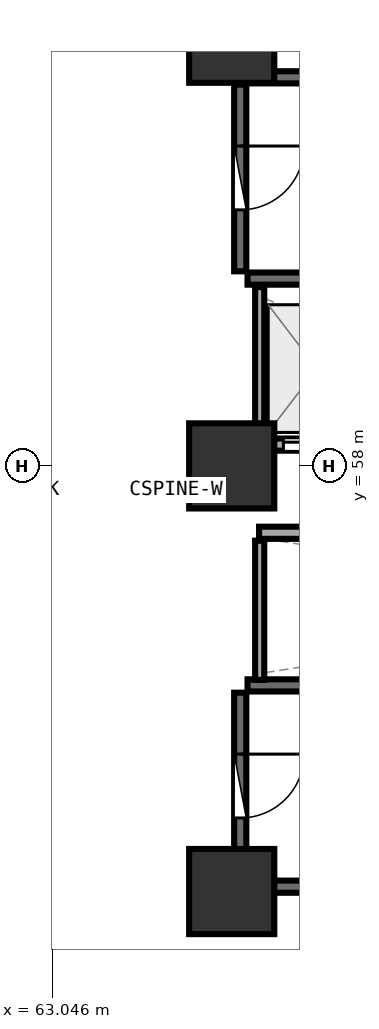
"""IFC4 building model, lengths in metres.
Left out: names, types, materials, properties, quantities, classifications, styles, units other than length and angle.
Written with IfcOpenShell. Run it as: python <this file> out.ifc"""

import sys

from ifc_helpers import new_model, si_unit, direction, frame, frame_2d, origin, origin_2d, place, context, subcontext, project, spatial, rectangle, extrude, element, fill, save


model = new_model("IFC4")
c1 = context("Model", 3, precision=1e-05, world=origin(), true_north=direction((0.0, 1.0)))
c2 = subcontext(c1, "Body", "Model", "MODEL_VIEW")
j1 = project(units=[si_unit("LENGTHUNIT", "METRE"), si_unit("PLANEANGLEUNIT", "RADIAN")], contexts=[c1])
p1 = place(None, origin())
s1 = spatial("IfcSite", under=j1, at=p1, CompositionType="ELEMENT")
p2 = place(p1, origin())
s2 = spatial("IfcBuilding", under=s1, at=p2, CompositionType="ELEMENT")
p3 = place(p2, frame((0.0, 0.0, 56.25)))
s3 = spatial("IfcBuildingStorey", under=s2, at=p3, CompositionType="ELEMENT", Elevation=56.25)
for number, where, z_axis, x_axis in (
    (1, (66.0, 51.0, 0.0), (0.0, 0.0, 1.0), (1.0, 0.0, 0.0)),
    (2, (66.0, 65.0, 0.0), (0.0, 0.0, 1.0), (1.0, 0.0, 0.0)),
    (3, (66.0, 58.0, 0.0), (0.0, 0.0, 1.0), (1.0, 0.0, 0.0)),
):
    element("IfcColumn", number, at=place(p3, frame(where, z_axis=z_axis, x_axis=x_axis)), inside=s3, PredefinedType="PILASTER", context=c2, shape_type="SweptSolid", body=[
        extrude(rectangle(XDim=1.4, YDim=1.4, at=origin_2d()), origin(), (0.0, 0.0, 1.0), 3.75),
    ])
for number, where, z_axis, x_axis in (
    (4, (66.26, 61.08, 0.0), (0.0, 0.0, 1.0), (1.0, 0.0, 0.0)),
    (5, (73.42, 64.39, 0.0), (0.0, 0.0, 1.0), (-1.0, 0.0, 0.0)),
):
    element("IfcWall", number, at=place(p3, frame(where, z_axis=z_axis, x_axis=x_axis)), inside=s3, PredefinedType="SHEAR", context=c2, shape_type="SweptSolid", body=[
        extrude(rectangle(XDim=7.16, YDim=0.2, at=frame_2d((3.58, 0.0))), origin(), (0.0, 0.0, 1.0), 3.49),
    ])
p4 = place(p3, frame((66.14, 64.27, 0.0), z_axis=(0.0, 0.0, 1.0), x_axis=(0.0, -1.0, 0.0)))
e6 = element("IfcWall", 6, at=p4, inside=s3, PredefinedType="SHEAR", context=c2, shape_type="SweptSolid", body=[
    extrude(rectangle(XDim=3.07, YDim=0.2, at=frame_2d((1.535, 0.0))), origin(), (0.0, 0.0, 1.0), 3.49),
])
p5 = place(p4, frame((1.01, 0.0, 0.0)))
e7 = element("IfcOpeningElement", 7, at=p5, cuts=e6, PredefinedType="OPENING", context=c2, shape_type="SweptSolid", body=[
    extrude(rectangle(XDim=1.05, YDim=2.1, at=frame_2d((0.525, 1.05))), frame((0.0, 0.11, 0.0), z_axis=(0.0, -1.0, 0.0), x_axis=(1.0, 0.0, 0.0)), (0.0, 0.0, 1.0), 0.22),
])
for number, where, z_axis, x_axis in (
    (8, (66.26, 51.08, 0.0), (0.0, 0.0, 1.0), (1.0, 0.0, 0.0)),
    (9, (73.42, 54.39, 0.0), (0.0, 0.0, 1.0), (-1.0, 0.0, 0.0)),
):
    element("IfcWall", number, at=place(p3, frame(where, z_axis=z_axis, x_axis=x_axis)), inside=s3, PredefinedType="SHEAR", context=c2, shape_type="SweptSolid", body=[
        extrude(rectangle(XDim=7.16, YDim=0.2, at=frame_2d((3.58, 0.0))), origin(), (0.0, 0.0, 1.0), 3.49),
    ])
p6 = place(p3, frame((66.14, 54.27, 0.0), z_axis=(0.0, 0.0, 1.0), x_axis=(0.0, -1.0, 0.0)))
e10 = element("IfcWall", 10, at=p6, inside=s3, PredefinedType="SHEAR", context=c2, shape_type="SweptSolid", body=[
    extrude(rectangle(XDim=3.07, YDim=0.2, at=frame_2d((1.535, 0.0))), origin(), (0.0, 0.0, 1.0), 3.49),
])
p7 = place(p6, frame((1.01, 0.0, 0.0)))
e11 = element("IfcOpeningElement", 11, at=p7, cuts=e10, PredefinedType="OPENING", context=c2, shape_type="SweptSolid", body=[
    extrude(rectangle(XDim=1.05, YDim=2.1, at=frame_2d((0.525, 1.05))), frame((0.0, 0.11, 0.0), z_axis=(0.0, -1.0, 0.0), x_axis=(1.0, 0.0, 0.0)), (0.0, 0.0, 1.0), 0.22),
])
p8 = place(p3, frame((66.45, 58.35, 0.0), z_axis=(0.0, 0.0, 1.0), x_axis=(1.0, 0.0, 0.0)))
e12 = element("IfcWall", 12, at=p8, inside=s3, PredefinedType="SOLIDWALL", context=c2, shape_type="SweptSolid", body=[
    extrude(rectangle(XDim=6.0, YDim=0.2, at=frame_2d((3.0, 0.0))), origin(), (0.0, 0.0, 1.0), 3.48),
])
p9 = place(p8, frame((0.4, 0.0, 0.0)))
e13 = element("IfcOpeningElement", 13, at=p9, cuts=e12, PredefinedType="OPENING", context=c2, shape_type="SweptSolid", body=[
    extrude(rectangle(XDim=1.1, YDim=2.1, at=frame_2d((0.55, 1.05))), frame((0.0, 0.11, 0.0), z_axis=(0.0, -1.0, 0.0), x_axis=(1.0, 0.0, 0.0)), (0.0, 0.0, 1.0), 0.22),
])
p10 = place(p8, frame((2.4, 0.0, 0.0)))
e14 = element("IfcOpeningElement", 14, at=p10, cuts=e12, PredefinedType="OPENING", context=c2, shape_type="SweptSolid", body=[
    extrude(rectangle(XDim=1.1, YDim=2.1, at=frame_2d((0.55, 1.05))), frame((0.0, 0.11, 0.0), z_axis=(0.0, -1.0, 0.0), x_axis=(1.0, 0.0, 0.0)), (0.0, 0.0, 1.0), 0.22),
])
p11 = place(p8, frame((4.4, 0.0, 0.0)))
e15 = element("IfcOpeningElement", 15, at=p11, cuts=e12, PredefinedType="OPENING", context=c2, shape_type="SweptSolid", body=[
    extrude(rectangle(XDim=1.1, YDim=2.1, at=frame_2d((0.55, 1.05))), frame((0.0, 0.11, 0.0), z_axis=(0.0, -1.0, 0.0), x_axis=(1.0, 0.0, 0.0)), (0.0, 0.0, 1.0), 0.22),
])
p12 = place(p3, frame((66.46, 58.48, 0.0), z_axis=(0.0, 0.0, 1.0), x_axis=(0.0, 1.0, 0.0)))
e16 = element("IfcWall", 16, at=p12, inside=s3, PredefinedType="PARTITIONING", context=c2, shape_type="SweptSolid", body=[
    extrude(rectangle(XDim=2.46, YDim=0.15, at=frame_2d((1.23, 0.0))), origin(), (0.0, 0.0, 1.0), 3.48),
])
p13 = place(p3, frame((66.45, 56.9, 0.0), z_axis=(0.0, 0.0, 1.0), x_axis=(1.0, 0.0, 0.0)))
e17 = element("IfcWall", 17, at=p13, inside=s3, PredefinedType="SOLIDWALL", context=c2, shape_type="SweptSolid", body=[
    extrude(rectangle(XDim=14.4, YDim=0.2, at=frame_2d((7.2, 0.0))), origin(), (0.0, 0.0, 1.0), 3.48),
])
p14 = place(p3, frame((66.46, 54.48, 0.0), z_axis=(0.0, 0.0, 1.0), x_axis=(0.0, 1.0, 0.0)))
e18 = element("IfcWall", 18, at=p14, inside=s3, PredefinedType="PARTITIONING", context=c2, shape_type="SweptSolid", body=[
    extrude(rectangle(XDim=2.29, YDim=0.15, at=frame_2d((1.145, 0.0))), origin(), (0.0, 0.0, 1.0), 3.48),
])
p15 = place(p3, frame((60.071, 52.912, 0.0), z_axis=(0.0, 0.0, 1.0), x_axis=(0.594763174801, -0.80390096772, 0.0)))
e19 = element("IfcWall", 19, at=p15, inside=s3, PredefinedType="PARTITIONING", context=c2, shape_type="SweptSolid", body=[
    extrude(rectangle(XDim=5.81, YDim=0.12, at=frame_2d((2.905, 0.0))), origin(), (0.0, 0.0, 1.0), 2.875),
])
p16 = place(p15, frame((2.455, 0.0, 0.0)))
e20 = element("IfcOpeningElement", 20, at=p16, cuts=e19, PredefinedType="OPENING", context=c2, shape_type="SweptSolid", body=[
    extrude(rectangle(XDim=0.9, YDim=2.08, at=frame_2d((0.45, 1.04))), frame((0.0, 0.07, 0.0), z_axis=(0.0, -1.0, 0.0), x_axis=(1.0, 0.0, 0.0)), (0.0, 0.0, 1.0), 0.14),
])
p17 = place(p5, origin())
e21 = element("IfcDoor", 21, at=p17, inside=s3, OperationType="SINGLE_SWING_LEFT", PredefinedType="DOOR", context=c2, shape_type="SweptSolid", body=[
    extrude(rectangle(XDim=1.05, YDim=2.1, at=frame_2d((0.525, 1.05))), frame((0.0, 0.025, 0.0), z_axis=(0.0, -1.0, 0.0), x_axis=(1.0, 0.0, 0.0)), (0.0, 0.0, 1.0), 0.05),
])
fill(e7, e21)
p18 = place(p7, origin())
e22 = element("IfcDoor", 22, at=p18, inside=s3, OperationType="SINGLE_SWING_LEFT", PredefinedType="DOOR", context=c2, shape_type="SweptSolid", body=[
    extrude(rectangle(XDim=1.05, YDim=2.1, at=frame_2d((0.525, 1.05))), frame((0.0, 0.025, 0.0), z_axis=(0.0, -1.0, 0.0), x_axis=(1.0, 0.0, 0.0)), (0.0, 0.0, 1.0), 0.05),
])
fill(e11, e22)
p19 = place(p9, origin())
e23 = element("IfcDoor", 23, at=p19, inside=s3, OperationType="DOUBLE_DOOR_SLIDING", PredefinedType="DOOR", context=c2, shape_type="SweptSolid", body=[
    extrude(rectangle(XDim=1.1, YDim=2.1, at=frame_2d((0.55, 1.05))), frame((0.0, 0.025, 0.0), z_axis=(0.0, -1.0, 0.0), x_axis=(1.0, 0.0, 0.0)), (0.0, 0.0, 1.0), 0.05),
])
fill(e13, e23)
save(model, sys.argv[1])
